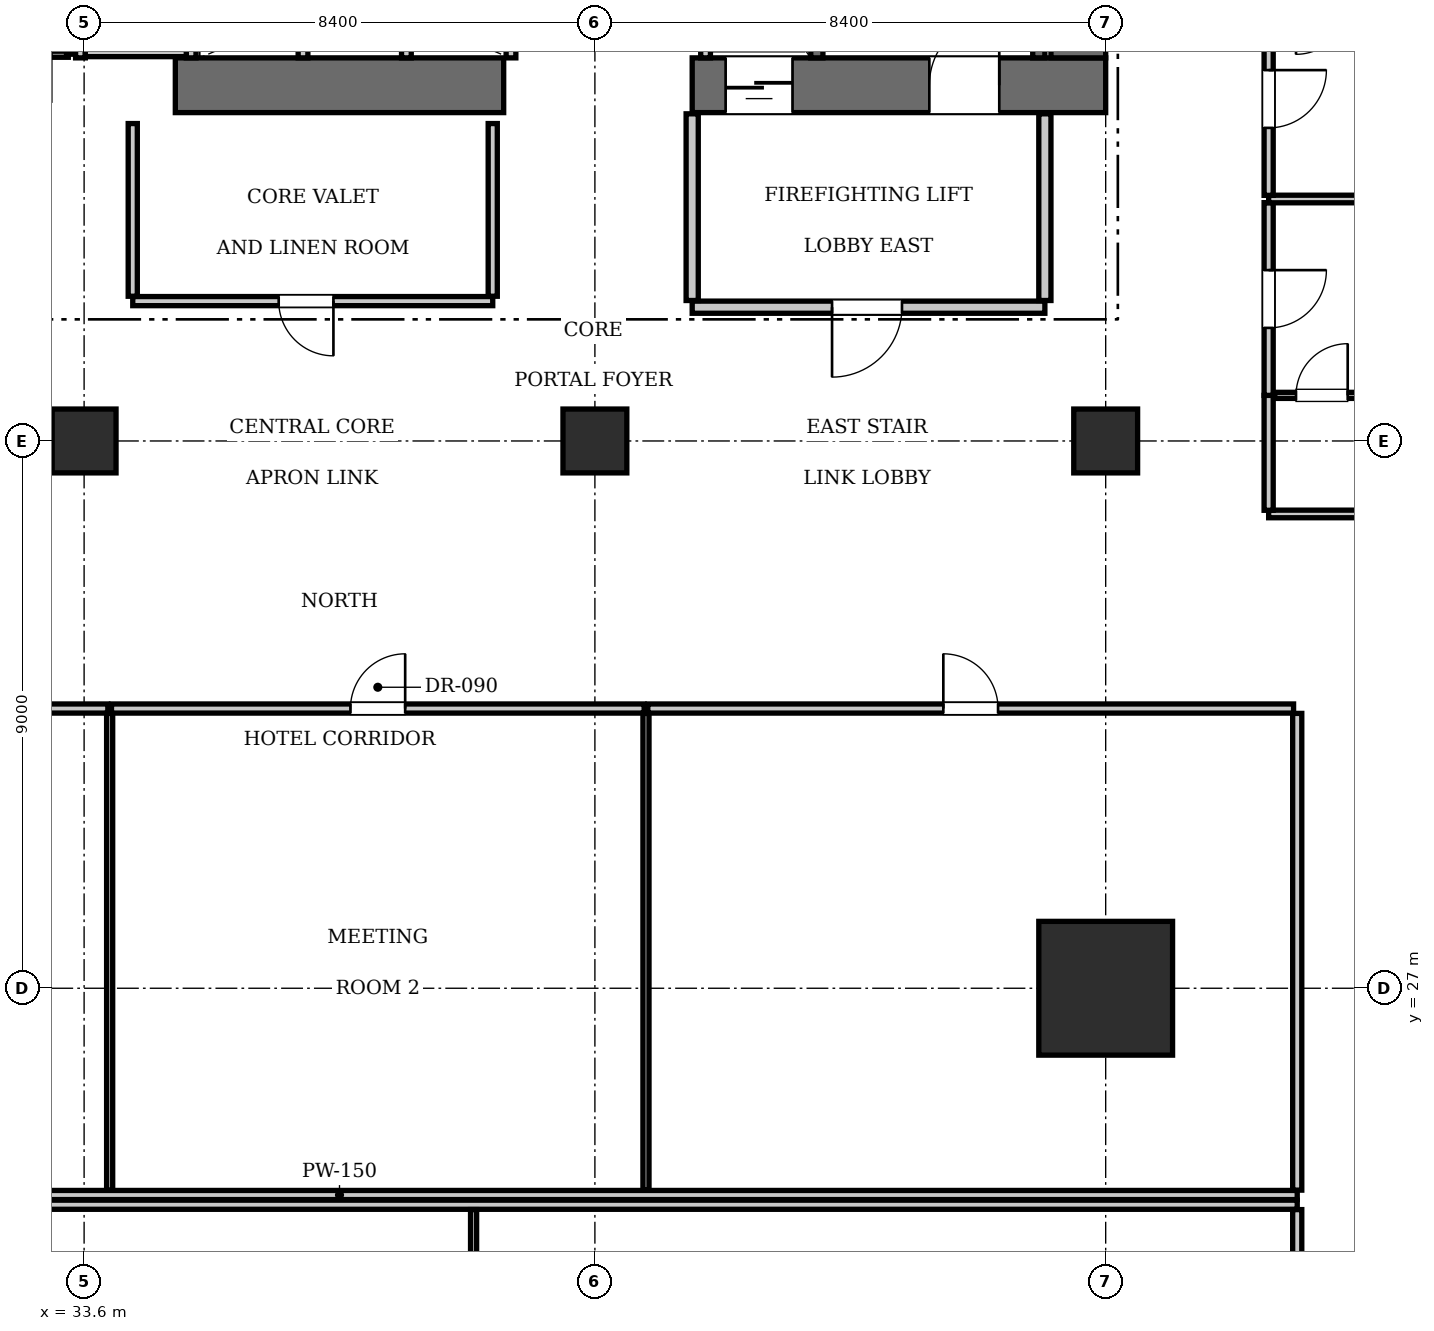
"""IFC4 building model, lengths in metres.
Left out: names, types, materials, properties, quantities, classifications, styles, units other than length and angle.
Written with IfcOpenShell. Run it as: python <this file> out.ifc"""

import sys

from ifc_helpers import new_model, si_unit, direction, frame, frame_2d, origin, origin_2d, place, context, subcontext, project, spatial, rectangle, extrude, element, fill, save


model = new_model("IFC4")
c1 = context("Model", 3, precision=1e-05, world=origin(), true_north=direction((0.0, 1.0)))
c2 = subcontext(c1, "Body", "Model", "MODEL_VIEW")
j1 = project(units=[si_unit("LENGTHUNIT", "METRE"), si_unit("PLANEANGLEUNIT", "RADIAN")], contexts=[c1])
p1 = place(None, origin())
s1 = spatial("IfcSite", under=j1, at=p1, CompositionType="ELEMENT")
p2 = place(p1, origin())
s2 = spatial("IfcBuilding", under=s1, at=p2, CompositionType="ELEMENT")
p3 = place(p2, frame((0.0, 0.0, 77.0)))
s3 = spatial("IfcBuildingStorey", under=s2, at=p3, CompositionType="ELEMENT", Elevation=77.0)
p4 = place(p3, frame((50.4, 27.0, 0.0), z_axis=(0.0, 0.0, 1.0), x_axis=(1.0, 0.0, 0.0)))
e1 = element("IfcColumn", 1, at=p4, inside=s3, PredefinedType="COLUMN", context=c2, shape_type="SweptSolid", body=[
    extrude(rectangle(XDim=2.2, YDim=2.2, at=origin_2d()), origin(), (0.0, 0.0, 1.0), 3.85),
])
p5 = place(p3, frame((35.1, 41.85, 0.0), z_axis=(0.0, 0.0, 1.0), x_axis=(1.0, 0.0, 0.0)))
e2 = element("IfcWall", 2, at=p5, inside=s3, PredefinedType="SHEAR", context=c2, shape_type="SweptSolid", body=[
    extrude(rectangle(XDim=5.4, YDim=0.9, at=frame_2d((2.7, 0.0))), origin(), (0.0, 0.0, 1.0), 3.85),
])
p6 = place(p3, frame((43.6, 41.85, 0.0), z_axis=(0.0, 0.0, 1.0), x_axis=(1.0, 0.0, 0.0)))
e3 = element("IfcWall", 3, at=p6, inside=s3, PredefinedType="SHEAR", context=c2, shape_type="SweptSolid", body=[
    extrude(rectangle(XDim=6.8, YDim=0.9, at=frame_2d((3.4, 0.0))), origin(), (0.0, 0.0, 1.0), 3.85),
])
p7 = place(p6, frame((3.9, 0.0, 0.0)))
e4 = element("IfcOpeningElement", 4, at=p7, cuts=e3, PredefinedType="OPENING", context=c2, shape_type="SweptSolid", body=[
    extrude(rectangle(XDim=1.15, YDim=2.15, at=frame_2d((0.575, 1.075))), frame((0.0, 0.46, 0.0), z_axis=(0.0, -1.0, 0.0), x_axis=(1.0, 0.0, 0.0)), (0.0, 0.0, 1.0), 0.92),
])
p8 = place(p6, frame((0.55, 0.0, 0.0)))
e5 = element("IfcOpeningElement", 5, at=p8, cuts=e3, PredefinedType="OPENING", context=c2, shape_type="SweptSolid", body=[
    extrude(rectangle(XDim=1.1, YDim=2.2, at=frame_2d((0.55, 1.1))), frame((0.0, 0.46, 0.0), z_axis=(0.0, -1.0, 0.0), x_axis=(1.0, 0.0, 0.0)), (0.0, 0.0, 1.0), 0.92),
])
p9 = place(p3, frame((49.95, 42.3, 0.0), z_axis=(0.0, 0.0, 1.0), x_axis=(0.0, 1.0, 0.0)))
e6 = element("IfcWall", 6, at=p9, inside=s3, PredefinedType="SHEAR", context=c2, shape_type="SweptSolid", body=[
    extrude(rectangle(XDim=1.6, YDim=0.9, at=frame_2d((0.8, 0.0))), origin(), (0.0, 0.0, 1.0), 3.85),
])
for number, where, z_axis, x_axis in (
    (7, (33.6, 36.0, 0.0), (0.0, 0.0, 1.0), (1.0, 0.0, 0.0)),
    (8, (42.0, 36.0, 0.0), (0.0, 0.0, 1.0), (1.0, 0.0, 0.0)),
    (9, (50.4, 36.0, 0.0), (0.0, 0.0, 1.0), (1.0, 0.0, 0.0)),
):
    element("IfcColumn", number, at=place(p3, frame(where, z_axis=z_axis, x_axis=x_axis)), inside=s3, PredefinedType="COLUMN", context=c2, shape_type="SweptSolid", body=[
        extrude(rectangle(XDim=1.05, YDim=1.05, at=origin_2d()), origin(), (0.0, 0.0, 1.0), 3.85),
    ])
p10 = place(p3, frame((45.65, 42.3, 0.0), z_axis=(0.0, 0.0, 1.0), x_axis=(0.0, 1.0, 0.0)))
e10 = element("IfcWall", 10, at=p10, inside=s3, PredefinedType="SOLIDWALL", context=c2, shape_type="SweptSolid", body=[
    extrude(rectangle(XDim=8.85, YDim=0.2, at=frame_2d((4.425, 0.0))), origin(), (0.0, 0.0, 1.0), 3.61),
])
p11 = place(p3, frame((49.3, 42.3, 0.0), z_axis=(0.0, 0.0, 1.0), x_axis=(0.0, 1.0, 0.0)))
e11 = element("IfcWall", 11, at=p11, inside=s3, PredefinedType="SOLIDWALL", context=c2, shape_type="SweptSolid", body=[
    extrude(rectangle(XDim=1.58, YDim=0.2, at=frame_2d((0.79, 0.0))), origin(), (0.0, 0.0, 1.0), 3.61),
])
p12 = place(p3, frame((43.82, 42.3, 0.0), z_axis=(0.0, 0.0, 1.0), x_axis=(0.0, 1.0, 0.0)))
e12 = element("IfcWall", 12, at=p12, inside=s3, PredefinedType="SOLIDWALL", context=c2, shape_type="SweptSolid", body=[
    extrude(rectangle(XDim=2.44, YDim=0.16, at=frame_2d((1.22, 0.0))), origin(), (0.0, 0.0, 1.0), 3.61),
])
for number, where, z_axis, x_axis in (
    (13, (37.2, 42.3, 0.0), (0.0, 0.0, 1.0), (0.0, 1.0, 0.0)),
    (14, (38.9, 42.3, 0.0), (0.0, 0.0, 1.0), (0.0, 1.0, 0.0)),
    (15, (40.62, 42.3, 0.0), (0.0, 0.0, 1.0), (0.0, 1.0, 0.0)),
):
    element("IfcWall", number, at=place(p3, frame(where, z_axis=z_axis, x_axis=x_axis)), inside=s3, PredefinedType="SOLIDWALL", context=c2, shape_type="SweptSolid", body=[
        extrude(rectangle(XDim=2.05, YDim=0.16, at=frame_2d((1.025, 0.0))), origin(), (0.0, 0.0, 1.0), 3.61),
    ])
for number, where, z_axis, x_axis in (
    (16, (33.54, 42.3, 0.0), (0.0, 0.0, 1.0), (0.0, 1.0, 0.0)),
    (17, (35.36, 42.3, 0.0), (0.0, 0.0, 1.0), (0.0, 1.0, 0.0)),
):
    element("IfcWall", number, at=place(p3, frame(where, z_axis=z_axis, x_axis=x_axis)), inside=s3, PredefinedType="SOLIDWALL", context=c2, shape_type="SweptSolid", body=[
        extrude(rectangle(XDim=2.1, YDim=0.16, at=frame_2d((1.05, 0.0))), origin(), (0.0, 0.0, 1.0), 3.61),
    ])
p13 = place(p3, frame((33.62, 42.4, 0.0), z_axis=(0.0, 0.0, 1.0), x_axis=(1.0, 0.0, 0.0)))
e18 = element("IfcWall", 18, at=p13, inside=s3, PredefinedType="SOLIDWALL", context=c2, shape_type="SweptSolid", body=[
    extrude(rectangle(XDim=1.66, YDim=0.16, at=frame_2d((0.83, 0.0))), origin(), (0.0, 0.0, 1.0), 3.61),
])
p14 = place(p3, frame((43.6, 38.2, 0.0), z_axis=(0.0, 0.0, 1.0), x_axis=(1.0, 0.0, 0.0)))
e19 = element("IfcWall", 19, at=p14, inside=s3, PredefinedType="PARTITIONING", context=c2, shape_type="SweptSolid", body=[
    extrude(rectangle(XDim=5.8, YDim=0.2, at=frame_2d((2.9, 0.0))), origin(), (0.0, 0.0, 1.0), 3.61),
])
p15 = place(p14, frame((2.3, 0.0, 0.0)))
e20 = element("IfcOpeningElement", 20, at=p15, cuts=e19, PredefinedType="OPENING", context=c2, shape_type="SweptSolid", body=[
    extrude(rectangle(XDim=1.15, YDim=2.15, at=frame_2d((0.575, 1.075))), frame((0.0, 0.11, 0.0), z_axis=(0.0, -1.0, 0.0), x_axis=(1.0, 0.0, 0.0)), (0.0, 0.0, 1.0), 0.22),
])
for number, where, z_axis, x_axis in (
    (21, (43.6, 38.31, 0.0), (0.0, 0.0, 1.0), (0.0, 1.0, 0.0)),
    (22, (49.4, 38.31, 0.0), (0.0, 0.0, 1.0), (0.0, 1.0, 0.0)),
):
    element("IfcWall", number, at=place(p3, frame(where, z_axis=z_axis, x_axis=x_axis)), inside=s3, PredefinedType="PARTITIONING", context=c2, shape_type="SweptSolid", body=[
        extrude(rectangle(XDim=3.07, YDim=0.2, at=frame_2d((1.535, 0.0))), origin(), (0.0, 0.0, 1.0), 3.61),
    ])
p16 = place(p3, frame((32.02, 42.36, 0.0), z_axis=(0.0, 0.0, 1.0), x_axis=(1.0, 0.0, 0.0)))
e23 = element("IfcWall", 23, at=p16, inside=s3, PredefinedType="PARTITIONING", context=c2, shape_type="SweptSolid", body=[
    extrude(rectangle(XDim=1.32, YDim=0.1, at=frame_2d((0.66, 0.0))), origin(), (0.0, 0.0, 1.0), 3.61),
])
p17 = place(p16, frame((0.24, 0.0, 0.0)))
e24 = element("IfcOpeningElement", 24, at=p17, cuts=e23, PredefinedType="OPENING", context=c2, shape_type="SweptSolid", body=[
    extrude(rectangle(XDim=0.8, YDim=2.05, at=frame_2d((0.4, 1.025))), frame((0.0, 0.06, 0.0), z_axis=(0.0, -1.0, 0.0), x_axis=(1.0, 0.0, 0.0)), (0.0, 0.0, 1.0), 0.12),
])
p18 = place(p3, frame((33.36, 42.36, 0.0), z_axis=(0.0, 0.0, 1.0), x_axis=(0.0, 1.0, 0.0)))
e25 = element("IfcWall", 25, at=p18, inside=s3, PredefinedType="PARTITIONING", context=c2, shape_type="SweptSolid", body=[
    extrude(rectangle(XDim=2.58, YDim=0.1, at=frame_2d((1.29, 0.0))), origin(), (0.0, 0.0, 1.0), 3.61),
])
p19 = place(p3, frame((34.4, 38.3, 0.0), z_axis=(0.0, 0.0, 1.0), x_axis=(1.0, 0.0, 0.0)))
e26 = element("IfcWall", 26, at=p19, inside=s3, PredefinedType="PARTITIONING", context=c2, shape_type="SweptSolid", body=[
    extrude(rectangle(XDim=5.92, YDim=0.15, at=frame_2d((2.96, 0.0))), origin(), (0.0, 0.0, 1.0), 3.61),
])
p20 = place(p19, frame((2.4, 0.0, 0.0)))
e27 = element("IfcOpeningElement", 27, at=p20, cuts=e26, PredefinedType="OPENING", context=c2, shape_type="SweptSolid", body=[
    extrude(rectangle(XDim=0.9, YDim=2.1, at=frame_2d((0.45, 1.05))), frame((0.0, 0.085, 0.0), z_axis=(0.0, -1.0, 0.0), x_axis=(1.0, 0.0, 0.0)), (0.0, 0.0, 1.0), 0.17),
])
for number, where, z_axis, x_axis in (
    (28, (34.4, 38.38, 0.0), (0.0, 0.0, 1.0), (0.0, 1.0, 0.0)),
    (29, (40.32, 38.38, 0.0), (0.0, 0.0, 1.0), (0.0, 1.0, 0.0)),
):
    element("IfcWall", number, at=place(p3, frame(where, z_axis=z_axis, x_axis=x_axis)), inside=s3, PredefinedType="PARTITIONING", context=c2, shape_type="SweptSolid", body=[
        extrude(rectangle(XDim=2.84, YDim=0.15, at=frame_2d((1.42, 0.0))), origin(), (0.0, 0.0, 1.0), 3.61),
    ])
p21 = place(p3, frame((22.05, 23.6, 0.0), z_axis=(0.0, 0.0, 1.0), x_axis=(1.0, 0.0, 0.0)))
e30 = element("IfcWall", 30, at=p21, inside=s3, PredefinedType="PARTITIONING", context=c2, shape_type="SweptSolid", body=[
    extrude(rectangle(XDim=31.5, YDim=0.15, at=frame_2d((15.75, 0.0))), origin(), (0.0, 0.0, 1.0), 3.61),
])
p22 = place(p3, frame((53.55, 23.68, 0.0), z_axis=(0.0, 0.0, 1.0), x_axis=(0.0, 1.0, 0.0)))
e31 = element("IfcWall", 31, at=p22, inside=s3, PredefinedType="PARTITIONING", context=c2, shape_type="SweptSolid", body=[
    extrude(rectangle(XDim=7.84, YDim=0.15, at=frame_2d((3.92, 0.0))), origin(), (0.0, 0.0, 1.0), 3.61),
])
p23 = place(p3, frame((27.12, 31.6, 0.0), z_axis=(0.0, 0.0, 1.0), x_axis=(1.0, 0.0, 0.0)))
e32 = element("IfcWall", 32, at=p23, inside=s3, PredefinedType="PARTITIONING", context=c2, shape_type="SweptSolid", body=[
    extrude(rectangle(XDim=6.87, YDim=0.15, at=frame_2d((3.435, 0.0))), origin(), (0.0, 0.0, 1.0), 3.61),
])
p24 = place(p23, frame((2.985, 0.0, 0.0)))
e33 = element("IfcOpeningElement", 33, at=p24, cuts=e32, PredefinedType="OPENING", context=c2, shape_type="SweptSolid", body=[
    extrude(rectangle(XDim=0.9, YDim=2.1, at=frame_2d((0.45, 1.05))), frame((0.0, 0.085, 0.0), z_axis=(0.0, -1.0, 0.0), x_axis=(1.0, 0.0, 0.0)), (0.0, 0.0, 1.0), 0.17),
])
p25 = place(p3, frame((34.02, 23.68, 0.0), z_axis=(0.0, 0.0, 1.0), x_axis=(0.0, 1.0, 0.0)))
e34 = element("IfcWall", 34, at=p25, inside=s3, PredefinedType="PARTITIONING", context=c2, shape_type="SweptSolid", body=[
    extrude(rectangle(XDim=7.84, YDim=0.1, at=frame_2d((3.92, 0.0))), origin(), (0.0, 0.0, 1.0), 3.61),
])
p26 = place(p3, frame((34.05, 31.6, 0.0), z_axis=(0.0, 0.0, 1.0), x_axis=(1.0, 0.0, 0.0)))
e35 = element("IfcWall", 35, at=p26, inside=s3, PredefinedType="PARTITIONING", context=c2, shape_type="SweptSolid", body=[
    extrude(rectangle(XDim=8.76, YDim=0.15, at=frame_2d((4.38, 0.0))), origin(), (0.0, 0.0, 1.0), 3.61),
])
p27 = place(p26, frame((3.93, 0.0, 0.0)))
e36 = element("IfcOpeningElement", 36, at=p27, cuts=e35, PredefinedType="OPENING", context=c2, shape_type="SweptSolid", body=[
    extrude(rectangle(XDim=0.9, YDim=2.1, at=frame_2d((0.45, 1.05))), frame((0.0, 0.085, 0.0), z_axis=(0.0, -1.0, 0.0), x_axis=(1.0, 0.0, 0.0)), (0.0, 0.0, 1.0), 0.17),
])
p28 = place(p3, frame((42.84, 23.68, 0.0), z_axis=(0.0, 0.0, 1.0), x_axis=(0.0, 1.0, 0.0)))
e37 = element("IfcWall", 37, at=p28, inside=s3, PredefinedType="PARTITIONING", context=c2, shape_type="SweptSolid", body=[
    extrude(rectangle(XDim=7.84, YDim=0.1, at=frame_2d((3.92, 0.0))), origin(), (0.0, 0.0, 1.0), 3.61),
])
p29 = place(p3, frame((42.87, 31.6, 0.0), z_axis=(0.0, 0.0, 1.0), x_axis=(1.0, 0.0, 0.0)))
e38 = element("IfcWall", 38, at=p29, inside=s3, PredefinedType="PARTITIONING", context=c2, shape_type="SweptSolid", body=[
    extrude(rectangle(XDim=10.62, YDim=0.15, at=frame_2d((5.31, 0.0))), origin(), (0.0, 0.0, 1.0), 3.61),
])
p30 = place(p29, frame((4.86, 0.0, 0.0)))
e39 = element("IfcOpeningElement", 39, at=p30, cuts=e38, PredefinedType="OPENING", context=c2, shape_type="SweptSolid", body=[
    extrude(rectangle(XDim=0.9, YDim=2.1, at=frame_2d((0.45, 1.05))), frame((0.0, 0.085, 0.0), z_axis=(0.0, -1.0, 0.0), x_axis=(1.0, 0.0, 0.0)), (0.0, 0.0, 1.0), 0.17),
])
p31 = place(p3, frame((22.05, 23.44, 0.0), z_axis=(0.0, 0.0, 1.0), x_axis=(1.0, 0.0, 0.0)))
e40 = element("IfcWall", 40, at=p31, inside=s3, PredefinedType="PARTITIONING", context=c2, shape_type="SweptSolid", body=[
    extrude(rectangle(XDim=31.5, YDim=0.15, at=frame_2d((15.75, 0.0))), origin(), (0.0, 0.0, 1.0), 3.61),
])
p32 = place(p3, frame((53.55, 15.53, 0.0), z_axis=(0.0, 0.0, 1.0), x_axis=(0.0, 1.0, 0.0)))
e41 = element("IfcWall", 41, at=p32, inside=s3, PredefinedType="PARTITIONING", context=c2, shape_type="SweptSolid", body=[
    extrude(rectangle(XDim=7.83, YDim=0.15, at=frame_2d((3.915, 0.0))), origin(), (0.0, 0.0, 1.0), 3.61),
])
p33 = place(p3, frame((40.005, 15.53, 0.0), z_axis=(0.0, 0.0, 1.0), x_axis=(0.0, 1.0, 0.0)))
e42 = element("IfcWall", 42, at=p33, inside=s3, PredefinedType="PARTITIONING", context=c2, shape_type="SweptSolid", body=[
    extrude(rectangle(XDim=7.83, YDim=0.1, at=frame_2d((3.915, 0.0))), origin(), (0.0, 0.0, 1.0), 3.61),
])
p34 = place(p3, frame((53.08, 34.8, 0.0), z_axis=(0.0, 0.0, 1.0), x_axis=(1.0, 0.0, 0.0)))
e43 = element("IfcWall", 43, at=p34, inside=s3, PredefinedType="PARTITIONING", context=c2, shape_type="SweptSolid", body=[
    extrude(rectangle(XDim=11.62, YDim=0.125, at=frame_2d((5.81, 0.0))), origin(), (0.0, 0.0, 1.0), 3.61),
])
p35 = place(p3, frame((53.08, 34.86, 0.0), z_axis=(0.0, 0.0, 1.0), x_axis=(0.0, 1.0, 0.0)))
e44 = element("IfcWall", 44, at=p35, inside=s3, PredefinedType="PARTITIONING", context=c2, shape_type="SweptSolid", body=[
    extrude(rectangle(XDim=1.89, YDim=0.15, at=frame_2d((0.945, 0.0))), origin(), (0.0, 0.0, 1.0), 3.61),
])
p36 = place(p3, frame((53.08, 36.75, 0.0), z_axis=(0.0, 0.0, 1.0), x_axis=(0.0, 1.0, 0.0)))
e45 = element("IfcWall", 45, at=p36, inside=s3, PredefinedType="PARTITIONING", context=c2, shape_type="SweptSolid", body=[
    extrude(rectangle(XDim=3.169, YDim=0.15, at=frame_2d((1.584, 0.0))), origin(), (0.0, 0.0, 1.0), 3.61),
])
p37 = place(p36, frame((1.11, 0.0, 0.0)))
e46 = element("IfcOpeningElement", 46, at=p37, cuts=e45, PredefinedType="OPENING", context=c2, shape_type="SweptSolid", body=[
    extrude(rectangle(XDim=0.95, YDim=2.15, at=frame_2d((0.475, 1.075))), frame((0.0, 0.085, 0.0), z_axis=(0.0, -1.0, 0.0), x_axis=(1.0, 0.0, 0.0)), (0.0, 0.0, 1.0), 0.17),
])
p38 = place(p3, frame((53.18, 36.75, 0.0), z_axis=(0.0, 0.0, 1.0), x_axis=(1.0, 0.0, 0.0)))
e47 = element("IfcWall", 47, at=p38, inside=s3, PredefinedType="PARTITIONING", context=c2, shape_type="SweptSolid", body=[
    extrude(rectangle(XDim=2.3, YDim=0.1, at=frame_2d((1.15, 0.0))), origin(), (0.0, 0.0, 1.0), 3.61),
])
p39 = place(p38, frame((0.35, 0.0, 0.0)))
e48 = element("IfcOpeningElement", 48, at=p39, cuts=e47, PredefinedType="OPENING", context=c2, shape_type="SweptSolid", body=[
    extrude(rectangle(XDim=0.85, YDim=2.1, at=frame_2d((0.425, 1.05))), frame((0.0, 0.06, 0.0), z_axis=(0.0, -1.0, 0.0), x_axis=(1.0, 0.0, 0.0)), (0.0, 0.0, 1.0), 0.12),
])
p40 = place(p3, frame((53.08, 39.979, 0.0), z_axis=(0.0, 0.0, 1.0), x_axis=(1.0, 0.0, 0.0)))
e49 = element("IfcWall", 49, at=p40, inside=s3, PredefinedType="PARTITIONING", context=c2, shape_type="SweptSolid", body=[
    extrude(rectangle(XDim=11.62, YDim=0.125, at=frame_2d((5.81, 0.0))), origin(), (0.0, 0.0, 1.0), 3.61),
])
p41 = place(p3, frame((53.08, 40.039, 0.0), z_axis=(0.0, 0.0, 1.0), x_axis=(0.0, 1.0, 0.0)))
e50 = element("IfcWall", 50, at=p41, inside=s3, PredefinedType="PARTITIONING", context=c2, shape_type="SweptSolid", body=[
    extrude(rectangle(XDim=3.169, YDim=0.15, at=frame_2d((1.584, 0.0))), origin(), (0.0, 0.0, 1.0), 3.61),
])
p42 = place(p41, frame((1.11, 0.0, 0.0)))
e51 = element("IfcOpeningElement", 51, at=p42, cuts=e50, PredefinedType="OPENING", context=c2, shape_type="SweptSolid", body=[
    extrude(rectangle(XDim=0.95, YDim=2.15, at=frame_2d((0.475, 1.075))), frame((0.0, 0.085, 0.0), z_axis=(0.0, -1.0, 0.0), x_axis=(1.0, 0.0, 0.0)), (0.0, 0.0, 1.0), 0.17),
])
p43 = place(p7, origin())
e52 = element("IfcDoor", 52, at=p43, inside=s3, OperationType="SINGLE_SWING_RIGHT", PredefinedType="DOOR", context=c2, shape_type="SweptSolid", body=[
    extrude(rectangle(XDim=1.15, YDim=2.15, at=frame_2d((0.575, 1.075))), frame((0.0, 0.025, 0.0), z_axis=(0.0, -1.0, 0.0), x_axis=(1.0, 0.0, 0.0)), (0.0, 0.0, 1.0), 0.05),
])
fill(e4, e52)
p44 = place(p8, frame((1.1, 0.0, 0.0), z_axis=(0.0, 0.0, 1.0), x_axis=(-1.0, 0.0, 0.0)))
e53 = element("IfcDoor", 53, at=p44, inside=s3, OperationType="SLIDING_TO_LEFT", PredefinedType="DOOR", context=c2, shape_type="SweptSolid", body=[
    extrude(rectangle(XDim=1.1, YDim=2.2, at=frame_2d((0.55, 1.1))), frame((0.0, 0.025, 0.0), z_axis=(0.0, -1.0, 0.0), x_axis=(1.0, 0.0, 0.0)), (0.0, 0.0, 1.0), 0.05),
])
fill(e5, e53)
p45 = place(p15, frame((1.15, 0.0, 0.0), z_axis=(0.0, 0.0, 1.0), x_axis=(-1.0, 0.0, 0.0)))
e54 = element("IfcDoor", 54, at=p45, inside=s3, OperationType="SINGLE_SWING_RIGHT", PredefinedType="DOOR", context=c2, shape_type="SweptSolid", body=[
    extrude(rectangle(XDim=1.15, YDim=2.15, at=frame_2d((0.575, 1.075))), frame((0.0, 0.025, 0.0), z_axis=(0.0, -1.0, 0.0), x_axis=(1.0, 0.0, 0.0)), (0.0, 0.0, 1.0), 0.05),
])
fill(e20, e54)
p46 = place(p20, frame((0.9, 0.0, 0.0), z_axis=(0.0, 0.0, 1.0), x_axis=(-1.0, 0.0, 0.0)))
e55 = element("IfcDoor", 55, at=p46, inside=s3, OperationType="SINGLE_SWING_LEFT", PredefinedType="DOOR", context=c2, shape_type="SweptSolid", body=[
    extrude(rectangle(XDim=0.9, YDim=2.1, at=frame_2d((0.45, 1.05))), frame((0.0, 0.025, 0.0), z_axis=(0.0, -1.0, 0.0), x_axis=(1.0, 0.0, 0.0)), (0.0, 0.0, 1.0), 0.05),
])
fill(e27, e55)
p47 = place(p27, origin())
e56 = element("IfcDoor", 56, at=p47, inside=s3, OperationType="SINGLE_SWING_RIGHT", PredefinedType="DOOR", context=c2, shape_type="SweptSolid", body=[
    extrude(rectangle(XDim=0.9, YDim=2.1, at=frame_2d((0.45, 1.05))), frame((0.0, 0.025, 0.0), z_axis=(0.0, -1.0, 0.0), x_axis=(1.0, 0.0, 0.0)), (0.0, 0.0, 1.0), 0.05),
])
fill(e36, e56)
p48 = place(p30, origin())
e57 = element("IfcDoor", 57, at=p48, inside=s3, OperationType="SINGLE_SWING_LEFT", PredefinedType="DOOR", context=c2, shape_type="SweptSolid", body=[
    extrude(rectangle(XDim=0.9, YDim=2.1, at=frame_2d((0.45, 1.05))), frame((0.0, 0.025, 0.0), z_axis=(0.0, -1.0, 0.0), x_axis=(1.0, 0.0, 0.0)), (0.0, 0.0, 1.0), 0.05),
])
fill(e39, e57)
p49 = place(p39, origin())
e58 = element("IfcDoor", 58, at=p49, inside=s3, OperationType="SINGLE_SWING_RIGHT", PredefinedType="DOOR", context=c2, shape_type="SweptSolid", body=[
    extrude(rectangle(XDim=0.85, YDim=2.1, at=frame_2d((0.425, 1.05))), frame((0.0, 0.025, 0.0), z_axis=(0.0, -1.0, 0.0), x_axis=(1.0, 0.0, 0.0)), (0.0, 0.0, 1.0), 0.05),
])
fill(e48, e58)
p50 = place(p37, frame((0.95, 0.0, 0.0), z_axis=(0.0, 0.0, 1.0), x_axis=(-1.0, 0.0, 0.0)))
e59 = element("IfcDoor", 59, at=p50, inside=s3, OperationType="SINGLE_SWING_LEFT", PredefinedType="DOOR", context=c2, shape_type="SweptSolid", body=[
    extrude(rectangle(XDim=0.95, YDim=2.15, at=frame_2d((0.475, 1.075))), frame((0.0, 0.025, 0.0), z_axis=(0.0, -1.0, 0.0), x_axis=(1.0, 0.0, 0.0)), (0.0, 0.0, 1.0), 0.05),
])
fill(e46, e59)
p51 = place(p42, frame((0.95, 0.0, 0.0), z_axis=(0.0, 0.0, 1.0), x_axis=(-1.0, 0.0, 0.0)))
e60 = element("IfcDoor", 60, at=p51, inside=s3, OperationType="SINGLE_SWING_LEFT", PredefinedType="DOOR", context=c2, shape_type="SweptSolid", body=[
    extrude(rectangle(XDim=0.95, YDim=2.15, at=frame_2d((0.475, 1.075))), frame((0.0, 0.025, 0.0), z_axis=(0.0, -1.0, 0.0), x_axis=(1.0, 0.0, 0.0)), (0.0, 0.0, 1.0), 0.05),
])
fill(e51, e60)
save(model, sys.argv[1])
